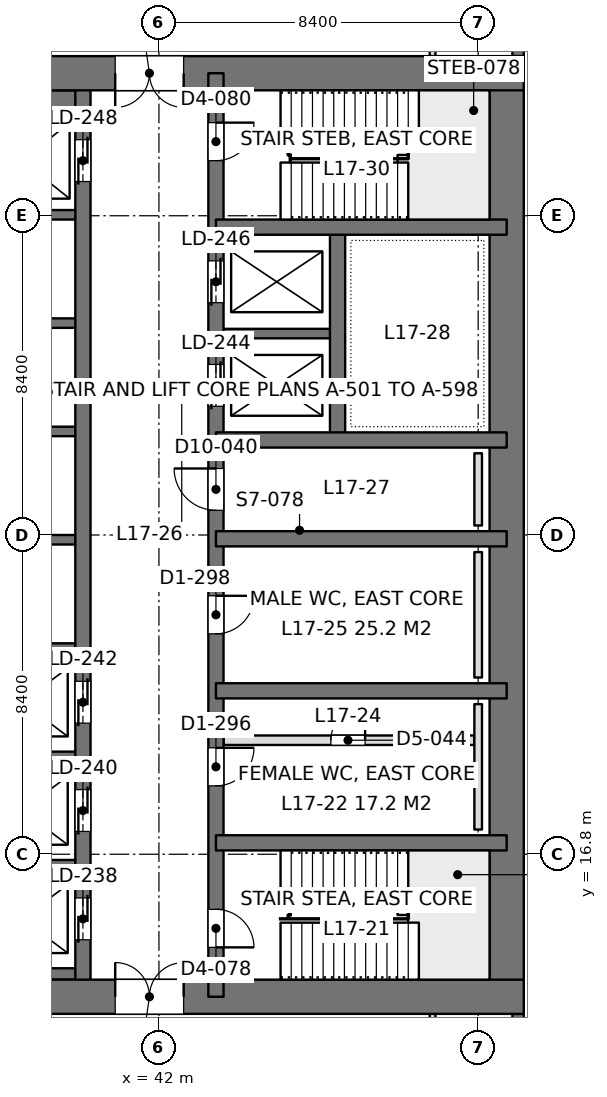
"""IFC4 building model, lengths in metres.
Left out: names, types, materials, properties, quantities, classifications, styles, units other than length and angle.
Written with IfcOpenShell. Run it as: python <this file> out.ifc"""

import sys

from ifc_helpers import new_model, si_unit, direction, frame, frame_2d, origin, place, context, subcontext, project, spatial, rectangle, extrude, element, fill, save


model = new_model("IFC4")
c1 = context("Model", 3, precision=1e-05, world=origin(), true_north=direction((0.0, 1.0)))
c2 = subcontext(c1, "Body", "Model", "MODEL_VIEW")
j1 = project(units=[si_unit("LENGTHUNIT", "METRE"), si_unit("PLANEANGLEUNIT", "RADIAN")], contexts=[c1])
p1 = place(None, origin())
s1 = spatial("IfcSite", under=j1, at=p1, CompositionType="ELEMENT")
p2 = place(p1, origin())
s2 = spatial("IfcBuilding", under=s1, at=p2, CompositionType="ELEMENT")
p3 = place(p2, frame((0.0, 0.0, 77.4)))
s3 = spatial("IfcBuildingStorey", under=s2, at=p3, CompositionType="ELEMENT", Elevation=77.4)
p4 = place(p3, frame((33.6, 13.05, 0.0), z_axis=(0.0, 0.0, 1.0), x_axis=(1.0, 0.0, 0.0)))
e1 = element("IfcWall", 1, at=p4, inside=s3, PredefinedType="SHEAR", context=c2, shape_type="SweptSolid", body=[
    extrude(rectangle(XDim=18.0, YDim=0.9, at=frame_2d((9.0, 0.0))), origin(), (0.0, 0.0, 1.0), 4.5),
])
p5 = place(p4, frame((7.25, 0.0, 0.0)))
e2 = element("IfcOpeningElement", 2, at=p5, cuts=e1, PredefinedType="OPENING", context=c2, shape_type="SweptSolid", body=[
    extrude(rectangle(XDim=1.8, YDim=2.4, at=frame_2d((0.9, 1.2))), frame((0.0, 0.46, 0.0), z_axis=(0.0, -1.0, 0.0), x_axis=(1.0, 0.0, 0.0)), (0.0, 0.0, 1.0), 0.92),
])
p6 = place(p3, frame((33.6, 37.35, 0.0), z_axis=(0.0, 0.0, 1.0), x_axis=(1.0, 0.0, 0.0)))
e3 = element("IfcWall", 3, at=p6, inside=s3, PredefinedType="SHEAR", context=c2, shape_type="SweptSolid", body=[
    extrude(rectangle(XDim=18.0, YDim=0.9, at=frame_2d((9.0, 0.0))), origin(), (0.0, 0.0, 1.0), 4.5),
])
p7 = place(p6, frame((7.25, 0.0, 0.0)))
e4 = element("IfcOpeningElement", 4, at=p7, cuts=e3, PredefinedType="OPENING", context=c2, shape_type="SweptSolid", body=[
    extrude(rectangle(XDim=1.8, YDim=2.4, at=frame_2d((0.9, 1.2))), frame((0.0, 0.46, 0.0), z_axis=(0.0, -1.0, 0.0), x_axis=(1.0, 0.0, 0.0)), (0.0, 0.0, 1.0), 0.92),
])
p8 = place(p3, frame((51.15, 13.05, 0.0), z_axis=(0.0, 0.0, 1.0), x_axis=(0.0, 1.0, 0.0)))
e5 = element("IfcWall", 5, at=p8, inside=s3, PredefinedType="SHEAR", context=c2, shape_type="SweptSolid", body=[
    extrude(rectangle(XDim=24.3, YDim=0.9, at=frame_2d((12.15, 0.0))), origin(), (0.0, 0.0, 1.0), 4.5),
])
p9 = place(p3, frame((43.5, 13.05, 0.0), z_axis=(0.0, 0.0, 1.0), x_axis=(0.0, 1.0, 0.0)))
e6 = element("IfcWall", 6, at=p9, inside=s3, PredefinedType="SHEAR", context=c2, shape_type="SweptSolid", body=[
    extrude(rectangle(XDim=24.3, YDim=0.4, at=frame_2d((12.15, 0.0))), origin(), (0.0, 0.0, 1.0), 4.5),
])
p10 = place(p9, frame((1.3, 0.0, 0.0)))
e7 = element("IfcOpeningElement", 7, at=p10, cuts=e6, PredefinedType="OPENING", context=c2, shape_type="SweptSolid", body=[
    extrude(rectangle(XDim=1.0, YDim=2.2, at=frame_2d((0.5, 1.1))), frame((0.0, 0.21, 0.0), z_axis=(0.0, -1.0, 0.0), x_axis=(1.0, 0.0, 0.0)), (0.0, 0.0, 1.0), 0.42),
])
p11 = place(p9, frame((22.0, 0.0, 0.0)))
e8 = element("IfcOpeningElement", 8, at=p11, cuts=e6, PredefinedType="OPENING", context=c2, shape_type="SweptSolid", body=[
    extrude(rectangle(XDim=1.0, YDim=2.2, at=frame_2d((0.5, 1.1))), frame((0.0, 0.21, 0.0), z_axis=(0.0, -1.0, 0.0), x_axis=(1.0, 0.0, 0.0)), (0.0, 0.0, 1.0), 0.42),
])
p12 = place(p9, frame((5.55, 0.0, 0.0)))
e9 = element("IfcOpeningElement", 9, at=p12, cuts=e6, PredefinedType="OPENING", context=c2, shape_type="SweptSolid", body=[
    extrude(rectangle(XDim=1.0, YDim=2.2, at=frame_2d((0.5, 1.1))), frame((0.0, 0.21, 0.0), z_axis=(0.0, -1.0, 0.0), x_axis=(1.0, 0.0, 0.0)), (0.0, 0.0, 1.0), 0.42),
])
p13 = place(p9, frame((9.55, 0.0, 0.0)))
e10 = element("IfcOpeningElement", 10, at=p13, cuts=e6, PredefinedType="OPENING", context=c2, shape_type="SweptSolid", body=[
    extrude(rectangle(XDim=1.0, YDim=2.2, at=frame_2d((0.5, 1.1))), frame((0.0, 0.21, 0.0), z_axis=(0.0, -1.0, 0.0), x_axis=(1.0, 0.0, 0.0)), (0.0, 0.0, 1.0), 0.42),
])
p14 = place(p9, frame((12.8, 0.0, 0.0)))
e11 = element("IfcOpeningElement", 11, at=p14, cuts=e6, PredefinedType="OPENING", context=c2, shape_type="SweptSolid", body=[
    extrude(rectangle(XDim=1.1, YDim=2.2, at=frame_2d((0.55, 1.1))), frame((0.0, 0.21, 0.0), z_axis=(0.0, -1.0, 0.0), x_axis=(1.0, 0.0, 0.0)), (0.0, 0.0, 1.0), 0.42),
])
p15 = place(p9, frame((15.538, 0.0, 0.0)))
e12 = element("IfcOpeningElement", 12, at=p15, cuts=e6, PredefinedType="OPENING", context=c2, shape_type="SweptSolid", body=[
    extrude(rectangle(XDim=1.1, YDim=2.2, at=frame_2d((0.55, 1.1))), frame((0.0, 0.21, 0.0), z_axis=(0.0, -1.0, 0.0), x_axis=(1.0, 0.0, 0.0)), (0.0, 0.0, 1.0), 0.42),
])
p16 = place(p9, frame((18.262, 0.0, 0.0)))
e13 = element("IfcOpeningElement", 13, at=p16, cuts=e6, PredefinedType="OPENING", context=c2, shape_type="SweptSolid", body=[
    extrude(rectangle(XDim=1.1, YDim=2.2, at=frame_2d((0.55, 1.1))), frame((0.0, 0.21, 0.0), z_axis=(0.0, -1.0, 0.0), x_axis=(1.0, 0.0, 0.0)), (0.0, 0.0, 1.0), 0.42),
])
p17 = place(p3, frame((40.0, 13.05, 0.0), z_axis=(0.0, 0.0, 1.0), x_axis=(0.0, 1.0, 0.0)))
e14 = element("IfcWall", 14, at=p17, inside=s3, PredefinedType="SHEAR", context=c2, shape_type="SweptSolid", body=[
    extrude(rectangle(XDim=24.3, YDim=0.4, at=frame_2d((12.15, 0.0))), origin(), (0.0, 0.0, 1.0), 4.5),
])
p18 = place(p17, frame((1.5, 0.0, 0.0)))
e15 = element("IfcOpeningElement", 15, at=p18, cuts=e14, PredefinedType="OPENING", context=c2, shape_type="SweptSolid", body=[
    extrude(rectangle(XDim=1.1, YDim=2.2, at=frame_2d((0.55, 1.1))), frame((0.0, 0.21, 0.0), z_axis=(0.0, -1.0, 0.0), x_axis=(1.0, 0.0, 0.0)), (0.0, 0.0, 1.0), 0.42),
])
p19 = place(p17, frame((4.35, 0.0, 0.0)))
e16 = element("IfcOpeningElement", 16, at=p19, cuts=e14, PredefinedType="OPENING", context=c2, shape_type="SweptSolid", body=[
    extrude(rectangle(XDim=1.1, YDim=2.2, at=frame_2d((0.55, 1.1))), frame((0.0, 0.21, 0.0), z_axis=(0.0, -1.0, 0.0), x_axis=(1.0, 0.0, 0.0)), (0.0, 0.0, 1.0), 0.42),
])
p20 = place(p17, frame((7.2, 0.0, 0.0)))
e17 = element("IfcOpeningElement", 17, at=p20, cuts=e14, PredefinedType="OPENING", context=c2, shape_type="SweptSolid", body=[
    extrude(rectangle(XDim=1.1, YDim=2.2, at=frame_2d((0.55, 1.1))), frame((0.0, 0.21, 0.0), z_axis=(0.0, -1.0, 0.0), x_axis=(1.0, 0.0, 0.0)), (0.0, 0.0, 1.0), 0.42),
])
p21 = place(p17, frame((21.45, 0.0, 0.0)))
e18 = element("IfcOpeningElement", 18, at=p21, cuts=e14, PredefinedType="OPENING", context=c2, shape_type="SweptSolid", body=[
    extrude(rectangle(XDim=1.1, YDim=2.2, at=frame_2d((0.55, 1.1))), frame((0.0, 0.21, 0.0), z_axis=(0.0, -1.0, 0.0), x_axis=(1.0, 0.0, 0.0)), (0.0, 0.0, 1.0), 0.42),
])
for number, where, z_axis, x_axis in (
    (19, (51.15, 17.1, 0.0), (0.0, 0.0, 1.0), (-1.0, 0.0, 0.0)),
    (20, (51.15, 21.1, 0.0), (0.0, 0.0, 1.0), (-1.0, 0.0, 0.0)),
    (21, (51.15, 25.1, 0.0), (0.0, 0.0, 1.0), (-1.0, 0.0, 0.0)),
    (22, (51.15, 27.7, 0.0), (0.0, 0.0, 1.0), (-1.0, 0.0, 0.0)),
    (23, (51.15, 33.3, 0.0), (0.0, 0.0, 1.0), (-1.0, 0.0, 0.0)),
):
    element("IfcWall", number, at=place(p3, frame(where, z_axis=z_axis, x_axis=x_axis)), inside=s3, PredefinedType="SHEAR", context=c2, shape_type="SweptSolid", body=[
        extrude(rectangle(XDim=7.65, YDim=0.4, at=frame_2d((3.825, 0.0))), origin(), (0.0, 0.0, 1.0), 4.5),
    ])
p22 = place(p3, frame((46.7, 27.7, 0.0), z_axis=(0.0, 0.0, 1.0), x_axis=(0.0, 1.0, 0.0)))
e24 = element("IfcWall", 24, at=p22, inside=s3, PredefinedType="SHEAR", context=c2, shape_type="SweptSolid", body=[
    extrude(rectangle(XDim=5.6, YDim=0.4, at=frame_2d((2.8, 0.0))), origin(), (0.0, 0.0, 1.0), 4.5),
])
p23 = place(p3, frame((46.7, 30.5, 0.0), z_axis=(0.0, 0.0, 1.0), x_axis=(-1.0, 0.0, 0.0)))
e25 = element("IfcWall", 25, at=p23, inside=s3, PredefinedType="SHEAR", context=c2, shape_type="SweptSolid", body=[
    extrude(rectangle(XDim=3.2, YDim=0.25, at=frame_2d((1.6, 0.0))), origin(), (0.0, 0.0, 1.0), 4.5),
])
p24 = place(p3, frame((40.0, 13.65, 0.0), z_axis=(0.0, 0.0, 1.0), x_axis=(-1.0, 0.0, 0.0)))
e26 = element("IfcWall", 26, at=p24, inside=s3, PredefinedType="SHEAR", context=c2, shape_type="SweptSolid", body=[
    extrude(rectangle(XDim=3.2, YDim=0.3, at=frame_2d((1.6, 0.0))), origin(), (0.0, 0.0, 1.0), 4.5),
])
for number, where, z_axis, x_axis in (
    (27, (40.0, 16.525, 0.0), (0.0, 0.0, 1.0), (-1.0, 0.0, 0.0)),
    (28, (40.0, 19.375, 0.0), (0.0, 0.0, 1.0), (-1.0, 0.0, 0.0)),
    (29, (40.0, 22.225, 0.0), (0.0, 0.0, 1.0), (-1.0, 0.0, 0.0)),
    (30, (40.0, 25.075, 0.0), (0.0, 0.0, 1.0), (-1.0, 0.0, 0.0)),
    (31, (40.0, 27.925, 0.0), (0.0, 0.0, 1.0), (-1.0, 0.0, 0.0)),
    (32, (40.0, 30.775, 0.0), (0.0, 0.0, 1.0), (-1.0, 0.0, 0.0)),
    (33, (40.0, 33.625, 0.0), (0.0, 0.0, 1.0), (-1.0, 0.0, 0.0)),
):
    element("IfcWall", number, at=place(p3, frame(where, z_axis=z_axis, x_axis=x_axis)), inside=s3, PredefinedType="SHEAR", context=c2, shape_type="SweptSolid", body=[
        extrude(rectangle(XDim=3.2, YDim=0.25, at=frame_2d((1.6, 0.0))), origin(), (0.0, 0.0, 1.0), 4.5),
    ])
p25 = place(p3, frame((40.0, 36.625, 0.0), z_axis=(0.0, 0.0, 1.0), x_axis=(-1.0, 0.0, 0.0)))
e34 = element("IfcWall", 34, at=p25, inside=s3, PredefinedType="SHEAR", context=c2, shape_type="SweptSolid", body=[
    extrude(rectangle(XDim=3.2, YDim=0.55, at=frame_2d((1.6, 0.0))), origin(), (0.0, 0.0, 1.0), 4.5),
])
p26 = place(p3, frame((51.45, 42.0, 0.0), z_axis=(0.0, 0.0, 1.0), x_axis=(0.0, -1.0, 0.0)))
e35 = element("IfcWall", 35, at=p26, inside=s3, PredefinedType="SOLIDWALL", context=c2, shape_type="SweptSolid", body=[
    extrude(rectangle(XDim=4.2, YDim=0.3, at=frame_2d((2.1, 0.0))), origin(), (0.0, 0.0, 1.0), 4.34),
])
p27 = place(p26, frame((0.9, 0.0, 0.9)))
e36 = element("IfcOpeningElement", 36, at=p27, cuts=e35, PredefinedType="OPENING", context=c2, shape_type="SweptSolid", body=[
    extrude(rectangle(XDim=2.4, YDim=1.9, at=frame_2d((1.2, 0.95))), frame((0.0, 0.16, 0.0), z_axis=(0.0, -1.0, 0.0), x_axis=(1.0, 0.0, 0.0)), (0.0, 0.0, 1.0), 0.32),
])
p28 = place(p3, frame((51.45, 12.6, 0.0), z_axis=(0.0, 0.0, 1.0), x_axis=(0.0, -1.0, 0.0)))
e37 = element("IfcWall", 37, at=p28, inside=s3, PredefinedType="SOLIDWALL", context=c2, shape_type="SweptSolid", body=[
    extrude(rectangle(XDim=4.2, YDim=0.3, at=frame_2d((2.1, 0.0))), origin(), (0.0, 0.0, 1.0), 4.34),
])
p29 = place(p28, frame((0.9, 0.0, 0.9)))
e38 = element("IfcOpeningElement", 38, at=p29, cuts=e37, PredefinedType="OPENING", context=c2, shape_type="SweptSolid", body=[
    extrude(rectangle(XDim=2.4, YDim=1.9, at=frame_2d((1.2, 0.95))), frame((0.0, 0.16, 0.0), z_axis=(0.0, -1.0, 0.0), x_axis=(1.0, 0.0, 0.0)), (0.0, 0.0, 1.0), 0.32),
])
p30 = place(p3, frame((49.2, 10.8, 0.0), z_axis=(0.0, 0.0, 1.0), x_axis=(0.0, 1.0, 0.0)))
e39 = element("IfcWall", 39, at=p30, inside=s3, PredefinedType="PARTITIONING", context=c2, shape_type="SweptSolid", body=[
    extrude(rectangle(XDim=1.802, YDim=0.15, at=frame_2d((0.901, 0.0))), origin(), (0.0, 0.0, 1.0), 4.34),
])
p31 = place(p3, frame((49.2, 37.8, 0.0), z_axis=(0.0, 0.0, 1.0), x_axis=(0.0, 1.0, 0.0)))
e40 = element("IfcWall", 40, at=p31, inside=s3, PredefinedType="PARTITIONING", context=c2, shape_type="SweptSolid", body=[
    extrude(rectangle(XDim=1.8, YDim=0.15, at=frame_2d((0.9, 0.0))), origin(), (0.0, 0.0, 1.0), 4.34),
])
p32 = place(p3, frame((43.7, 19.8, 0.0), z_axis=(0.0, 0.0, 1.0), x_axis=(1.0, 0.0, 0.0)))
e41 = element("IfcWall", 41, at=p32, inside=s3, PredefinedType="PARTITIONING", context=c2, shape_type="SweptSolid", body=[
    extrude(rectangle(XDim=6.6, YDim=0.25, at=frame_2d((3.3, 0.0))), origin(), (0.0, 0.0, 1.0), 4.3),
])
p33 = place(p32, frame((2.825, 0.0, 0.0)))
e42 = element("IfcOpeningElement", 42, at=p33, cuts=e41, PredefinedType="OPENING", context=c2, shape_type="SweptSolid", body=[
    extrude(rectangle(XDim=0.9, YDim=2.2, at=frame_2d((0.45, 1.1))), frame((0.0, 0.135, 0.0), z_axis=(0.0, -1.0, 0.0), x_axis=(1.0, 0.0, 0.0)), (0.0, 0.0, 1.0), 0.27),
])
for number, where, z_axis, x_axis in (
    (43, (50.4, 17.45, 0.0), (0.0, 0.0, 1.0), (0.0, 1.0, 0.0)),
    (44, (50.4, 21.45, 0.0), (0.0, 0.0, 1.0), (0.0, 1.0, 0.0)),
):
    element("IfcWall", number, at=place(p3, frame(where, z_axis=z_axis, x_axis=x_axis)), inside=s3, PredefinedType="PLUMBINGWALL", context=c2, shape_type="SweptSolid", body=[
        extrude(rectangle(XDim=3.3, YDim=0.2, at=frame_2d((1.65, 0.0))), origin(), (0.0, 0.0, 1.0), 1.2),
    ])
p34 = place(p3, frame((50.4, 25.45, 0.0), z_axis=(0.0, 0.0, 1.0), x_axis=(0.0, 1.0, 0.0)))
e45 = element("IfcWall", 45, at=p34, inside=s3, PredefinedType="PLUMBINGWALL", context=c2, shape_type="SweptSolid", body=[
    extrude(rectangle(XDim=1.9, YDim=0.2, at=frame_2d((0.95, 0.0))), origin(), (0.0, 0.0, 1.0), 1.2),
])
p35 = place(p5, origin())
e46 = element("IfcDoor", 46, at=p35, inside=s3, OperationType="DOUBLE_DOOR_SINGLE_SWING", PredefinedType="DOOR", context=c2, shape_type="SweptSolid", body=[
    extrude(rectangle(XDim=1.8, YDim=2.4, at=frame_2d((0.9, 1.2))), frame((0.0, 0.025, 0.0), z_axis=(0.0, -1.0, 0.0), x_axis=(1.0, 0.0, 0.0)), (0.0, 0.0, 1.0), 0.05),
])
fill(e2, e46)
p36 = place(p7, frame((1.8, 0.0, 0.0), z_axis=(0.0, 0.0, 1.0), x_axis=(-1.0, 0.0, 0.0)))
e47 = element("IfcDoor", 47, at=p36, inside=s3, OperationType="DOUBLE_DOOR_SINGLE_SWING", PredefinedType="DOOR", context=c2, shape_type="SweptSolid", body=[
    extrude(rectangle(XDim=1.8, YDim=2.4, at=frame_2d((0.9, 1.2))), frame((0.0, 0.025, 0.0), z_axis=(0.0, -1.0, 0.0), x_axis=(1.0, 0.0, 0.0)), (0.0, 0.0, 1.0), 0.05),
])
fill(e4, e47)
p37 = place(p10, frame((1.0, 0.0, 0.0), z_axis=(0.0, 0.0, 1.0), x_axis=(-1.0, 0.0, 0.0)))
e48 = element("IfcDoor", 48, at=p37, inside=s3, OperationType="SINGLE_SWING_RIGHT", PredefinedType="DOOR", context=c2, shape_type="SweptSolid", body=[
    extrude(rectangle(XDim=1.0, YDim=2.2, at=frame_2d((0.5, 1.1))), frame((0.0, 0.025, 0.0), z_axis=(0.0, -1.0, 0.0), x_axis=(1.0, 0.0, 0.0)), (0.0, 0.0, 1.0), 0.05),
])
fill(e7, e48)
p38 = place(p11, frame((1.0, 0.0, 0.0), z_axis=(0.0, 0.0, 1.0), x_axis=(-1.0, 0.0, 0.0)))
e49 = element("IfcDoor", 49, at=p38, inside=s3, OperationType="SINGLE_SWING_LEFT", PredefinedType="DOOR", context=c2, shape_type="SweptSolid", body=[
    extrude(rectangle(XDim=1.0, YDim=2.2, at=frame_2d((0.5, 1.1))), frame((0.0, 0.025, 0.0), z_axis=(0.0, -1.0, 0.0), x_axis=(1.0, 0.0, 0.0)), (0.0, 0.0, 1.0), 0.05),
])
fill(e8, e49)
p39 = place(p12, frame((1.0, 0.0, 0.0), z_axis=(0.0, 0.0, 1.0), x_axis=(-1.0, 0.0, 0.0)))
e50 = element("IfcDoor", 50, at=p39, inside=s3, OperationType="SINGLE_SWING_LEFT", PredefinedType="DOOR", context=c2, shape_type="SweptSolid", body=[
    extrude(rectangle(XDim=1.0, YDim=2.2, at=frame_2d((0.5, 1.1))), frame((0.0, 0.025, 0.0), z_axis=(0.0, -1.0, 0.0), x_axis=(1.0, 0.0, 0.0)), (0.0, 0.0, 1.0), 0.05),
])
fill(e9, e50)
p40 = place(p13, frame((1.0, 0.0, 0.0), z_axis=(0.0, 0.0, 1.0), x_axis=(-1.0, 0.0, 0.0)))
e51 = element("IfcDoor", 51, at=p40, inside=s3, OperationType="SINGLE_SWING_LEFT", PredefinedType="DOOR", context=c2, shape_type="SweptSolid", body=[
    extrude(rectangle(XDim=1.0, YDim=2.2, at=frame_2d((0.5, 1.1))), frame((0.0, 0.025, 0.0), z_axis=(0.0, -1.0, 0.0), x_axis=(1.0, 0.0, 0.0)), (0.0, 0.0, 1.0), 0.05),
])
fill(e10, e51)
p41 = place(p14, origin())
e52 = element("IfcDoor", 52, at=p41, inside=s3, OperationType="SINGLE_SWING_RIGHT", PredefinedType="DOOR", context=c2, shape_type="SweptSolid", body=[
    extrude(rectangle(XDim=1.1, YDim=2.2, at=frame_2d((0.55, 1.1))), frame((0.0, 0.025, 0.0), z_axis=(0.0, -1.0, 0.0), x_axis=(1.0, 0.0, 0.0)), (0.0, 0.0, 1.0), 0.05),
])
fill(e11, e52)
p42 = place(p18, origin())
e53 = element("IfcDoor", 53, at=p42, inside=s3, OperationType="DOUBLE_DOOR_SLIDING", PredefinedType="DOOR", context=c2, shape_type="SweptSolid", body=[
    extrude(rectangle(XDim=1.1, YDim=2.2, at=frame_2d((0.55, 1.1))), frame((0.0, 0.025, 0.0), z_axis=(0.0, -1.0, 0.0), x_axis=(1.0, 0.0, 0.0)), (0.0, 0.0, 1.0), 0.05),
])
fill(e15, e53)
p43 = place(p19, origin())
e54 = element("IfcDoor", 54, at=p43, inside=s3, OperationType="DOUBLE_DOOR_SLIDING", PredefinedType="DOOR", context=c2, shape_type="SweptSolid", body=[
    extrude(rectangle(XDim=1.1, YDim=2.2, at=frame_2d((0.55, 1.1))), frame((0.0, 0.025, 0.0), z_axis=(0.0, -1.0, 0.0), x_axis=(1.0, 0.0, 0.0)), (0.0, 0.0, 1.0), 0.05),
])
fill(e16, e54)
p44 = place(p20, origin())
e55 = element("IfcDoor", 55, at=p44, inside=s3, OperationType="DOUBLE_DOOR_SLIDING", PredefinedType="DOOR", context=c2, shape_type="SweptSolid", body=[
    extrude(rectangle(XDim=1.1, YDim=2.2, at=frame_2d((0.55, 1.1))), frame((0.0, 0.025, 0.0), z_axis=(0.0, -1.0, 0.0), x_axis=(1.0, 0.0, 0.0)), (0.0, 0.0, 1.0), 0.05),
])
fill(e17, e55)
p45 = place(p21, origin())
e56 = element("IfcDoor", 56, at=p45, inside=s3, OperationType="DOUBLE_DOOR_SLIDING", PredefinedType="DOOR", context=c2, shape_type="SweptSolid", body=[
    extrude(rectangle(XDim=1.1, YDim=2.2, at=frame_2d((0.55, 1.1))), frame((0.0, 0.025, 0.0), z_axis=(0.0, -1.0, 0.0), x_axis=(1.0, 0.0, 0.0)), (0.0, 0.0, 1.0), 0.05),
])
fill(e18, e56)
p46 = place(p15, origin())
e57 = element("IfcDoor", 57, at=p46, inside=s3, OperationType="DOUBLE_DOOR_SLIDING", PredefinedType="DOOR", context=c2, shape_type="SweptSolid", body=[
    extrude(rectangle(XDim=1.1, YDim=2.2, at=frame_2d((0.55, 1.1))), frame((0.0, 0.025, 0.0), z_axis=(0.0, -1.0, 0.0), x_axis=(1.0, 0.0, 0.0)), (0.0, 0.0, 1.0), 0.05),
])
fill(e12, e57)
p47 = place(p16, origin())
e58 = element("IfcDoor", 58, at=p47, inside=s3, OperationType="DOUBLE_DOOR_SLIDING", PredefinedType="DOOR", context=c2, shape_type="SweptSolid", body=[
    extrude(rectangle(XDim=1.1, YDim=2.2, at=frame_2d((0.55, 1.1))), frame((0.0, 0.025, 0.0), z_axis=(0.0, -1.0, 0.0), x_axis=(1.0, 0.0, 0.0)), (0.0, 0.0, 1.0), 0.05),
])
fill(e13, e58)
p48 = place(p33, origin())
e59 = element("IfcDoor", 59, at=p48, inside=s3, OperationType="SINGLE_SWING_RIGHT", PredefinedType="DOOR", context=c2, shape_type="SweptSolid", body=[
    extrude(rectangle(XDim=0.9, YDim=2.2, at=frame_2d((0.45, 1.1))), frame((0.0, 0.025, 0.0), z_axis=(0.0, -1.0, 0.0), x_axis=(1.0, 0.0, 0.0)), (0.0, 0.0, 1.0), 0.05),
])
fill(e42, e59)
save(model, sys.argv[1])
